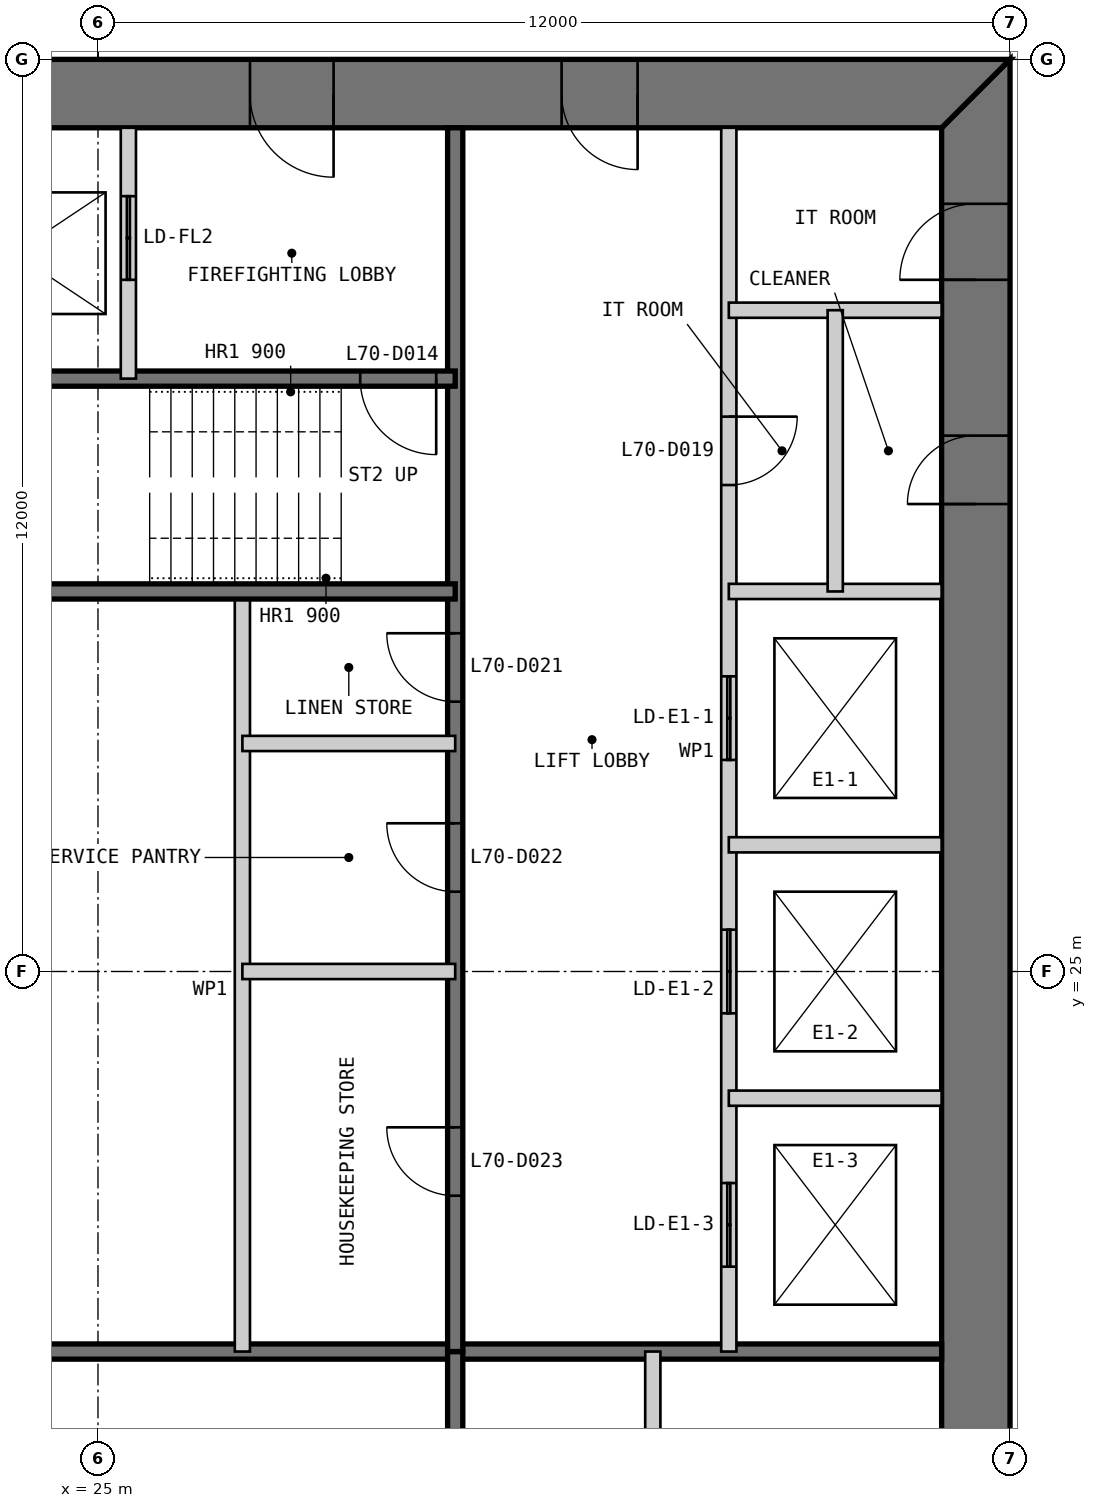
"""IFC4 building model, lengths in metres.
Left out: names, types, materials, properties, quantities, classifications, styles, units other than length and angle.
Written with IfcOpenShell. Run it as: python <this file> out.ifc"""

import sys

from ifc_helpers import new_model, si_unit, direction, frame, frame_2d, origin, place, context, subcontext, project, spatial, polyline, rectangle, outline, extrude, element, fill, save


model = new_model("IFC4")
c1 = context("Model", 3, precision=1e-05, world=origin(), true_north=direction((0.0, 1.0)))
c2 = subcontext(c1, "Body", "Model", "MODEL_VIEW")
j1 = project(units=[si_unit("LENGTHUNIT", "METRE"), si_unit("PLANEANGLEUNIT", "RADIAN")], contexts=[c1])
p1 = place(None, origin())
s1 = spatial("IfcSite", under=j1, at=p1, CompositionType="ELEMENT")
p2 = place(p1, origin())
s2 = spatial("IfcBuilding", under=s1, at=p2, CompositionType="ELEMENT")
p3 = place(p2, frame((0.0, 0.0, 290.0)))
s3 = spatial("IfcBuildingStorey", under=s2, at=p3, CompositionType="ELEMENT", Elevation=290.0)
p4 = place(p3, frame((36.55, 13.9, 0.0), z_axis=(0.0, 0.0, 1.0), x_axis=(0.0, 1.0, 0.0)))
e1 = element("IfcWall", 1, at=p4, inside=s3, PredefinedType="SHEAR", context=c2, shape_type="SweptSolid", body=[
    extrude(outline(polyline([(-0.9, -0.45), (23.1, -0.45), (22.2, 0.45), (0.0, 0.45), (-0.9, -0.45)])), origin(), (0.0, 0.0, 1.0), 3.4),
])
p5 = place(p4, frame((20.2, 0.0, 0.0)))
e2 = element("IfcOpeningElement", 2, at=p5, cuts=e1, PredefinedType="OPENING", context=c2, shape_type="SweptSolid", body=[
    extrude(rectangle(XDim=1.0, YDim=2.2, at=frame_2d((0.5, 1.1))), frame((0.0, 0.46, 0.0), z_axis=(0.0, -1.0, 0.0), x_axis=(1.0, 0.0, 0.0)), (0.0, 0.0, 1.0), 0.92),
])
p6 = place(p4, frame((17.25, 0.0, 0.0)))
e3 = element("IfcOpeningElement", 3, at=p6, cuts=e1, PredefinedType="OPENING", context=c2, shape_type="SweptSolid", body=[
    extrude(rectangle(XDim=0.9, YDim=2.2, at=frame_2d((0.45, 1.1))), frame((0.0, 0.46, 0.0), z_axis=(0.0, -1.0, 0.0), x_axis=(1.0, 0.0, 0.0)), (0.0, 0.0, 1.0), 0.92),
])
p7 = place(p3, frame((37.0, 36.55, 0.0), z_axis=(0.0, 0.0, 1.0), x_axis=(-1.0, 0.0, 0.0)))
e4 = element("IfcWall", 4, at=p7, inside=s3, PredefinedType="SHEAR", context=c2, shape_type="SweptSolid", body=[
    extrude(outline(polyline([(0.0, -0.45), (24.0, -0.45), (23.1, 0.45), (0.9, 0.45), (0.0, -0.45)])), origin(), (0.0, 0.0, 1.0), 3.4),
])
p8 = place(p7, frame((4.9, 0.0, 0.0)))
e5 = element("IfcOpeningElement", 5, at=p8, cuts=e4, PredefinedType="OPENING", context=c2, shape_type="SweptSolid", body=[
    extrude(rectangle(XDim=1.0, YDim=2.2, at=frame_2d((0.5, 1.1))), frame((0.0, 0.46, 0.0), z_axis=(0.0, -1.0, 0.0), x_axis=(1.0, 0.0, 0.0)), (0.0, 0.0, 1.0), 0.92),
])
p9 = place(p7, frame((8.9, 0.0, 0.0)))
e6 = element("IfcOpeningElement", 6, at=p9, cuts=e4, PredefinedType="OPENING", context=c2, shape_type="SweptSolid", body=[
    extrude(rectangle(XDim=1.1, YDim=2.2, at=frame_2d((0.55, 1.1))), frame((0.0, 0.46, 0.0), z_axis=(0.0, -1.0, 0.0), x_axis=(1.0, 0.0, 0.0)), (0.0, 0.0, 1.0), 0.92),
])
p10 = place(p7, frame((15.05, 0.0, 0.0)))
e7 = element("IfcOpeningElement", 7, at=p10, cuts=e4, PredefinedType="OPENING", context=c2, shape_type="SweptSolid", body=[
    extrude(rectangle(XDim=0.9, YDim=2.2, at=frame_2d((0.45, 1.1))), frame((0.0, 0.46, 0.0), z_axis=(0.0, -1.0, 0.0), x_axis=(1.0, 0.0, 0.0)), (0.0, 0.0, 1.0), 0.92),
])
p11 = place(p7, frame((17.9, 0.0, 0.0)))
e8 = element("IfcOpeningElement", 8, at=p11, cuts=e4, PredefinedType="OPENING", context=c2, shape_type="SweptSolid", body=[
    extrude(rectangle(XDim=1.0, YDim=2.2, at=frame_2d((0.5, 1.1))), frame((0.0, 0.46, 0.0), z_axis=(0.0, -1.0, 0.0), x_axis=(1.0, 0.0, 0.0)), (0.0, 0.0, 1.0), 0.92),
])
p12 = place(p7, frame((21.4, 0.0, 0.0)))
e9 = element("IfcOpeningElement", 9, at=p12, cuts=e4, PredefinedType="OPENING", context=c2, shape_type="SweptSolid", body=[
    extrude(rectangle(XDim=1.0, YDim=2.2, at=frame_2d((0.5, 1.1))), frame((0.0, 0.46, 0.0), z_axis=(0.0, -1.0, 0.0), x_axis=(1.0, 0.0, 0.0)), (0.0, 0.0, 1.0), 0.92),
])
p13 = place(p3, frame((20.3, 20.0, 0.0), z_axis=(0.0, 0.0, 1.0), x_axis=(1.0, 0.0, 0.0)))
e10 = element("IfcWall", 10, at=p13, inside=s3, PredefinedType="SOLIDWALL", context=c2, shape_type="SweptSolid", body=[
    extrude(rectangle(XDim=15.8, YDim=0.2, at=frame_2d((7.9, 0.0))), origin(), (0.0, 0.0, 1.0), 3.2),
])
p14 = place(p3, frame((29.7, 13.9, 0.0), z_axis=(0.0, 0.0, 1.0), x_axis=(0.0, 1.0, 0.0)))
e11 = element("IfcWall", 11, at=p14, inside=s3, PredefinedType="SOLIDWALL", context=c2, shape_type="SweptSolid", body=[
    extrude(rectangle(XDim=6.1, YDim=0.2, at=frame_2d((3.05, 0.0))), origin(), (0.0, 0.0, 1.0), 3.2),
])
p15 = place(p3, frame((32.3, 13.9, 0.0), z_axis=(0.0, 0.0, 1.0), x_axis=(0.0, 1.0, 0.0)))
e12 = element("IfcWall", 12, at=p15, inside=s3, PredefinedType="PARTITIONING", context=c2, shape_type="SweptSolid", body=[
    extrude(rectangle(XDim=6.1, YDim=0.2, at=frame_2d((3.05, 0.0))), origin(), (0.0, 0.0, 1.0), 3.2),
])
p16 = place(p3, frame((33.3, 36.1, 0.0), z_axis=(0.0, 0.0, 1.0), x_axis=(0.0, -1.0, 0.0)))
e13 = element("IfcWall", 13, at=p16, inside=s3, PredefinedType="PARTITIONING", context=c2, shape_type="SweptSolid", body=[
    extrude(rectangle(XDim=16.1, YDim=0.2, at=frame_2d((8.05, 0.0))), origin(), (0.0, 0.0, 1.0), 3.2),
])
p17 = place(p16, frame((3.8, 0.0, 0.0)))
e14 = element("IfcOpeningElement", 14, at=p17, cuts=e13, PredefinedType="OPENING", context=c2, shape_type="SweptSolid", body=[
    extrude(rectangle(XDim=0.9, YDim=2.2, at=frame_2d((0.45, 1.1))), frame((0.0, 0.11, 0.0), z_axis=(0.0, -1.0, 0.0), x_axis=(1.0, 0.0, 0.0)), (0.0, 0.0, 1.0), 0.22),
])
p18 = place(p16, frame((7.217, 0.0, 0.0)))
e15 = element("IfcOpeningElement", 15, at=p18, cuts=e13, PredefinedType="OPENING", context=c2, shape_type="SweptSolid", body=[
    extrude(rectangle(XDim=1.1, YDim=2.2, at=frame_2d((0.55, 1.1))), frame((0.0, 0.11, 0.0), z_axis=(0.0, -1.0, 0.0), x_axis=(1.0, 0.0, 0.0)), (0.0, 0.0, 1.0), 0.22),
])
p19 = place(p16, frame((10.55, 0.0, 0.0)))
e16 = element("IfcOpeningElement", 16, at=p19, cuts=e13, PredefinedType="OPENING", context=c2, shape_type="SweptSolid", body=[
    extrude(rectangle(XDim=1.1, YDim=2.2, at=frame_2d((0.55, 1.1))), frame((0.0, 0.11, 0.0), z_axis=(0.0, -1.0, 0.0), x_axis=(1.0, 0.0, 0.0)), (0.0, 0.0, 1.0), 0.22),
])
p20 = place(p16, frame((13.883, 0.0, 0.0)))
e17 = element("IfcOpeningElement", 17, at=p20, cuts=e13, PredefinedType="OPENING", context=c2, shape_type="SweptSolid", body=[
    extrude(rectangle(XDim=1.1, YDim=2.2, at=frame_2d((0.55, 1.1))), frame((0.0, 0.11, 0.0), z_axis=(0.0, -1.0, 0.0), x_axis=(1.0, 0.0, 0.0)), (0.0, 0.0, 1.0), 0.22),
])
p21 = place(p3, frame((29.7, 36.1, 0.0), z_axis=(0.0, 0.0, 1.0), x_axis=(0.0, -1.0, 0.0)))
e18 = element("IfcWall", 18, at=p21, inside=s3, PredefinedType="SOLIDWALL", context=c2, shape_type="SweptSolid", body=[
    extrude(rectangle(XDim=16.1, YDim=0.2, at=frame_2d((8.05, 0.0))), origin(), (0.0, 0.0, 1.0), 3.2),
])
p22 = place(p21, frame((6.65, 0.0, 0.0)))
e19 = element("IfcOpeningElement", 19, at=p22, cuts=e18, PredefinedType="OPENING", context=c2, shape_type="SweptSolid", body=[
    extrude(rectangle(XDim=0.9, YDim=2.2, at=frame_2d((0.45, 1.1))), frame((0.0, 0.11, 0.0), z_axis=(0.0, -1.0, 0.0), x_axis=(1.0, 0.0, 0.0)), (0.0, 0.0, 1.0), 0.22),
])
p23 = place(p21, frame((9.15, 0.0, 0.0)))
e20 = element("IfcOpeningElement", 20, at=p23, cuts=e18, PredefinedType="OPENING", context=c2, shape_type="SweptSolid", body=[
    extrude(rectangle(XDim=0.9, YDim=2.2, at=frame_2d((0.45, 1.1))), frame((0.0, 0.11, 0.0), z_axis=(0.0, -1.0, 0.0), x_axis=(1.0, 0.0, 0.0)), (0.0, 0.0, 1.0), 0.22),
])
p24 = place(p21, frame((13.15, 0.0, 0.0)))
e21 = element("IfcOpeningElement", 21, at=p24, cuts=e18, PredefinedType="OPENING", context=c2, shape_type="SweptSolid", body=[
    extrude(rectangle(XDim=0.9, YDim=2.2, at=frame_2d((0.45, 1.1))), frame((0.0, 0.11, 0.0), z_axis=(0.0, -1.0, 0.0), x_axis=(1.0, 0.0, 0.0)), (0.0, 0.0, 1.0), 0.22),
])
for number, where, z_axis, x_axis in (
    (22, (36.1, 30.0, 0.0), (0.0, 0.0, 1.0), (-1.0, 0.0, 0.0)),
    (23, (36.1, 26.667, 0.0), (0.0, 0.0, 1.0), (-1.0, 0.0, 0.0)),
    (24, (36.1, 23.333, 0.0), (0.0, 0.0, 1.0), (-1.0, 0.0, 0.0)),
):
    element("IfcWall", number, at=place(p3, frame(where, z_axis=z_axis, x_axis=x_axis)), inside=s3, PredefinedType="PARTITIONING", context=c2, shape_type="SweptSolid", body=[
        extrude(rectangle(XDim=2.8, YDim=0.2, at=frame_2d((1.4, 0.0))), origin(), (0.0, 0.0, 1.0), 3.2),
    ])
p25 = place(p3, frame((26.9, 30.0, 0.0), z_axis=(0.0, 0.0, 1.0), x_axis=(0.0, -1.0, 0.0)))
e25 = element("IfcWall", 25, at=p25, inside=s3, PredefinedType="PARTITIONING", context=c2, shape_type="SweptSolid", body=[
    extrude(rectangle(XDim=10.0, YDim=0.2, at=frame_2d((5.0, 0.0))), origin(), (0.0, 0.0, 1.0), 3.2),
])
p26 = place(p3, frame((29.7, 32.8, 0.0), z_axis=(0.0, 0.0, 1.0), x_axis=(-1.0, 0.0, 0.0)))
e26 = element("IfcWall", 26, at=p26, inside=s3, PredefinedType="SOLIDWALL", context=c2, shape_type="SweptSolid", body=[
    extrude(rectangle(XDim=9.4, YDim=0.2, at=frame_2d((4.7, 0.0))), origin(), (0.0, 0.0, 1.0), 3.2),
])
p27 = place(p26, frame((0.25, 0.0, 0.0)))
e27 = element("IfcOpeningElement", 27, at=p27, cuts=e26, PredefinedType="OPENING", context=c2, shape_type="SweptSolid", body=[
    extrude(rectangle(XDim=1.0, YDim=2.2, at=frame_2d((0.5, 1.1))), frame((0.0, 0.11, 0.0), z_axis=(0.0, -1.0, 0.0), x_axis=(1.0, 0.0, 0.0)), (0.0, 0.0, 1.0), 0.22),
])
p28 = place(p3, frame((29.7, 30.0, 0.0), z_axis=(0.0, 0.0, 1.0), x_axis=(-1.0, 0.0, 0.0)))
e28 = element("IfcWall", 28, at=p28, inside=s3, PredefinedType="SOLIDWALL", context=c2, shape_type="SweptSolid", body=[
    extrude(rectangle(XDim=15.8, YDim=0.2, at=frame_2d((7.9, 0.0))), origin(), (0.0, 0.0, 1.0), 3.2),
])
p29 = place(p3, frame((25.4, 36.1, 0.0), z_axis=(0.0, 0.0, 1.0), x_axis=(0.0, -1.0, 0.0)))
e29 = element("IfcWall", 29, at=p29, inside=s3, PredefinedType="PARTITIONING", context=c2, shape_type="SweptSolid", body=[
    extrude(rectangle(XDim=3.3, YDim=0.2, at=frame_2d((1.65, 0.0))), origin(), (0.0, 0.0, 1.0), 3.2),
])
p30 = place(p29, frame((0.9, 0.0, 0.0)))
e30 = element("IfcOpeningElement", 30, at=p30, cuts=e29, PredefinedType="OPENING", context=c2, shape_type="SweptSolid", body=[
    extrude(rectangle(XDim=1.1, YDim=2.2, at=frame_2d((0.55, 1.1))), frame((0.0, 0.11, 0.0), z_axis=(0.0, -1.0, 0.0), x_axis=(1.0, 0.0, 0.0)), (0.0, 0.0, 1.0), 0.22),
])
p31 = place(p3, frame((36.1, 33.7, 0.0), z_axis=(0.0, 0.0, 1.0), x_axis=(-1.0, 0.0, 0.0)))
e31 = element("IfcWall", 31, at=p31, inside=s3, PredefinedType="PARTITIONING", context=c2, shape_type="SweptSolid", body=[
    extrude(rectangle(XDim=2.8, YDim=0.2, at=frame_2d((1.4, 0.0))), origin(), (0.0, 0.0, 1.0), 3.2),
])
p32 = place(p3, frame((34.7, 33.7, 0.0), z_axis=(0.0, 0.0, 1.0), x_axis=(0.0, -1.0, 0.0)))
e32 = element("IfcWall", 32, at=p32, inside=s3, PredefinedType="PARTITIONING", context=c2, shape_type="SweptSolid", body=[
    extrude(rectangle(XDim=3.7, YDim=0.2, at=frame_2d((1.85, 0.0))), origin(), (0.0, 0.0, 1.0), 3.2),
])
for number, where, z_axis, x_axis in (
    (33, (29.7, 28.0, 0.0), (0.0, 0.0, 1.0), (-1.0, 0.0, 0.0)),
    (34, (29.7, 25.0, 0.0), (0.0, 0.0, 1.0), (-1.0, 0.0, 0.0)),
):
    element("IfcWall", number, at=place(p3, frame(where, z_axis=z_axis, x_axis=x_axis)), inside=s3, PredefinedType="PARTITIONING", context=c2, shape_type="SweptSolid", body=[
        extrude(rectangle(XDim=2.8, YDim=0.2, at=frame_2d((1.4, 0.0))), origin(), (0.0, 0.0, 1.0), 3.2),
    ])
p33 = place(p8, origin())
e35 = element("IfcDoor", 35, at=p33, inside=s3, OperationType="SINGLE_SWING_LEFT", PredefinedType="DOOR", context=c2, shape_type="SweptSolid", body=[
    extrude(rectangle(XDim=1.0, YDim=2.2, at=frame_2d((0.5, 1.1))), frame((0.0, 0.025, 0.0), z_axis=(0.0, -1.0, 0.0), x_axis=(1.0, 0.0, 0.0)), (0.0, 0.0, 1.0), 0.05),
    extrude(outline(polyline([(0.0, 0.0), (0.04, 0.0), (0.04, 2.16), (0.96, 2.16), (0.96, 0.0), (1.0, 0.0), (1.0, 2.2), (0.0, 2.2), (0.0, 0.0)])), frame((0.0, 0.3, 0.0), z_axis=(0.0, -1.0, 0.0), x_axis=(1.0, 0.0, 0.0)), (0.0, 0.0, 1.0), 0.6),
])
fill(e5, e35)
p34 = place(p9, origin())
e36 = element("IfcDoor", 36, at=p34, inside=s3, OperationType="SINGLE_SWING_LEFT", PredefinedType="DOOR", context=c2, shape_type="SweptSolid", body=[
    extrude(rectangle(XDim=1.1, YDim=2.2, at=frame_2d((0.55, 1.1))), frame((0.0, 0.025, 0.0), z_axis=(0.0, -1.0, 0.0), x_axis=(1.0, 0.0, 0.0)), (0.0, 0.0, 1.0), 0.05),
    extrude(outline(polyline([(0.0, 0.0), (0.04, 0.0), (0.04, 2.16), (1.06, 2.16), (1.06, 0.0), (1.1, 0.0), (1.1, 2.2), (0.0, 2.2), (0.0, 0.0)])), frame((0.0, 0.3, 0.0), z_axis=(0.0, -1.0, 0.0), x_axis=(1.0, 0.0, 0.0)), (0.0, 0.0, 1.0), 0.6),
])
fill(e6, e36)
p35 = place(p27, origin())
e37 = element("IfcDoor", 37, at=p35, inside=s3, OperationType="SINGLE_SWING_LEFT", PredefinedType="DOOR", context=c2, shape_type="SweptSolid", body=[
    extrude(rectangle(XDim=1.0, YDim=2.2, at=frame_2d((0.5, 1.1))), frame((0.0, 0.025, 0.0), z_axis=(0.0, -1.0, 0.0), x_axis=(1.0, 0.0, 0.0)), (0.0, 0.0, 1.0), 0.05),
])
fill(e27, e37)
p36 = place(p5, origin())
e38 = element("IfcDoor", 38, at=p36, inside=s3, OperationType="SINGLE_SWING_LEFT", PredefinedType="DOOR", context=c2, shape_type="SweptSolid", body=[
    extrude(rectangle(XDim=1.0, YDim=2.2, at=frame_2d((0.5, 1.1))), frame((0.0, 0.025, 0.0), z_axis=(0.0, -1.0, 0.0), x_axis=(1.0, 0.0, 0.0)), (0.0, 0.0, 1.0), 0.05),
    extrude(outline(polyline([(0.0, 0.0), (0.04, 0.0), (0.04, 2.16), (0.96, 2.16), (0.96, 0.0), (1.0, 0.0), (1.0, 2.2), (0.0, 2.2), (0.0, 0.0)])), frame((0.0, 0.3, 0.0), z_axis=(0.0, -1.0, 0.0), x_axis=(1.0, 0.0, 0.0)), (0.0, 0.0, 1.0), 0.6),
])
fill(e2, e38)
p37 = place(p17, origin())
e39 = element("IfcDoor", 39, at=p37, inside=s3, OperationType="SINGLE_SWING_LEFT", PredefinedType="DOOR", context=c2, shape_type="SweptSolid", body=[
    extrude(rectangle(XDim=0.9, YDim=2.2, at=frame_2d((0.45, 1.1))), frame((0.0, 0.025, 0.0), z_axis=(0.0, -1.0, 0.0), x_axis=(1.0, 0.0, 0.0)), (0.0, 0.0, 1.0), 0.05),
])
fill(e14, e39)
p38 = place(p6, origin())
e40 = element("IfcDoor", 40, at=p38, inside=s3, OperationType="SINGLE_SWING_LEFT", PredefinedType="DOOR", context=c2, shape_type="SweptSolid", body=[
    extrude(rectangle(XDim=0.9, YDim=2.2, at=frame_2d((0.45, 1.1))), frame((0.0, 0.025, 0.0), z_axis=(0.0, -1.0, 0.0), x_axis=(1.0, 0.0, 0.0)), (0.0, 0.0, 1.0), 0.05),
    extrude(outline(polyline([(0.0, 0.0), (0.04, 0.0), (0.04, 2.16), (0.86, 2.16), (0.86, 0.0), (0.9, 0.0), (0.9, 2.2), (0.0, 2.2), (0.0, 0.0)])), frame((0.0, 0.3, 0.0), z_axis=(0.0, -1.0, 0.0), x_axis=(1.0, 0.0, 0.0)), (0.0, 0.0, 1.0), 0.6),
])
fill(e3, e40)
p39 = place(p22, frame((0.9, 0.0, 0.0), z_axis=(0.0, 0.0, 1.0), x_axis=(-1.0, 0.0, 0.0)))
e41 = element("IfcDoor", 41, at=p39, inside=s3, OperationType="SINGLE_SWING_RIGHT", PredefinedType="DOOR", context=c2, shape_type="SweptSolid", body=[
    extrude(rectangle(XDim=0.9, YDim=2.2, at=frame_2d((0.45, 1.1))), frame((0.0, 0.025, 0.0), z_axis=(0.0, -1.0, 0.0), x_axis=(1.0, 0.0, 0.0)), (0.0, 0.0, 1.0), 0.05),
])
fill(e19, e41)
p40 = place(p23, frame((0.9, 0.0, 0.0), z_axis=(0.0, 0.0, 1.0), x_axis=(-1.0, 0.0, 0.0)))
e42 = element("IfcDoor", 42, at=p40, inside=s3, OperationType="SINGLE_SWING_RIGHT", PredefinedType="DOOR", context=c2, shape_type="SweptSolid", body=[
    extrude(rectangle(XDim=0.9, YDim=2.2, at=frame_2d((0.45, 1.1))), frame((0.0, 0.025, 0.0), z_axis=(0.0, -1.0, 0.0), x_axis=(1.0, 0.0, 0.0)), (0.0, 0.0, 1.0), 0.05),
])
fill(e20, e42)
p41 = place(p24, frame((0.9, 0.0, 0.0), z_axis=(0.0, 0.0, 1.0), x_axis=(-1.0, 0.0, 0.0)))
e43 = element("IfcDoor", 43, at=p41, inside=s3, OperationType="SINGLE_SWING_RIGHT", PredefinedType="DOOR", context=c2, shape_type="SweptSolid", body=[
    extrude(rectangle(XDim=0.9, YDim=2.2, at=frame_2d((0.45, 1.1))), frame((0.0, 0.025, 0.0), z_axis=(0.0, -1.0, 0.0), x_axis=(1.0, 0.0, 0.0)), (0.0, 0.0, 1.0), 0.05),
])
fill(e21, e43)
p42 = place(p30, origin())
e44 = element("IfcDoor", 44, at=p42, inside=s3, OperationType="DOUBLE_DOOR_SLIDING", PredefinedType="DOOR", context=c2, shape_type="SweptSolid", body=[
    extrude(rectangle(XDim=1.1, YDim=2.2, at=frame_2d((0.55, 1.1))), frame((0.0, 0.025, 0.0), z_axis=(0.0, -1.0, 0.0), x_axis=(1.0, 0.0, 0.0)), (0.0, 0.0, 1.0), 0.05),
])
fill(e30, e44)
p43 = place(p18, origin())
e45 = element("IfcDoor", 45, at=p43, inside=s3, OperationType="DOUBLE_DOOR_SLIDING", PredefinedType="DOOR", context=c2, shape_type="SweptSolid", body=[
    extrude(rectangle(XDim=1.1, YDim=2.2, at=frame_2d((0.55, 1.1))), frame((0.0, 0.025, 0.0), z_axis=(0.0, -1.0, 0.0), x_axis=(1.0, 0.0, 0.0)), (0.0, 0.0, 1.0), 0.05),
])
fill(e15, e45)
p44 = place(p19, origin())
e46 = element("IfcDoor", 46, at=p44, inside=s3, OperationType="DOUBLE_DOOR_SLIDING", PredefinedType="DOOR", context=c2, shape_type="SweptSolid", body=[
    extrude(rectangle(XDim=1.1, YDim=2.2, at=frame_2d((0.55, 1.1))), frame((0.0, 0.025, 0.0), z_axis=(0.0, -1.0, 0.0), x_axis=(1.0, 0.0, 0.0)), (0.0, 0.0, 1.0), 0.05),
])
fill(e16, e46)
p45 = place(p20, origin())
e47 = element("IfcDoor", 47, at=p45, inside=s3, OperationType="DOUBLE_DOOR_SLIDING", PredefinedType="DOOR", context=c2, shape_type="SweptSolid", body=[
    extrude(rectangle(XDim=1.1, YDim=2.2, at=frame_2d((0.55, 1.1))), frame((0.0, 0.025, 0.0), z_axis=(0.0, -1.0, 0.0), x_axis=(1.0, 0.0, 0.0)), (0.0, 0.0, 1.0), 0.05),
])
fill(e17, e47)
save(model, sys.argv[1])
